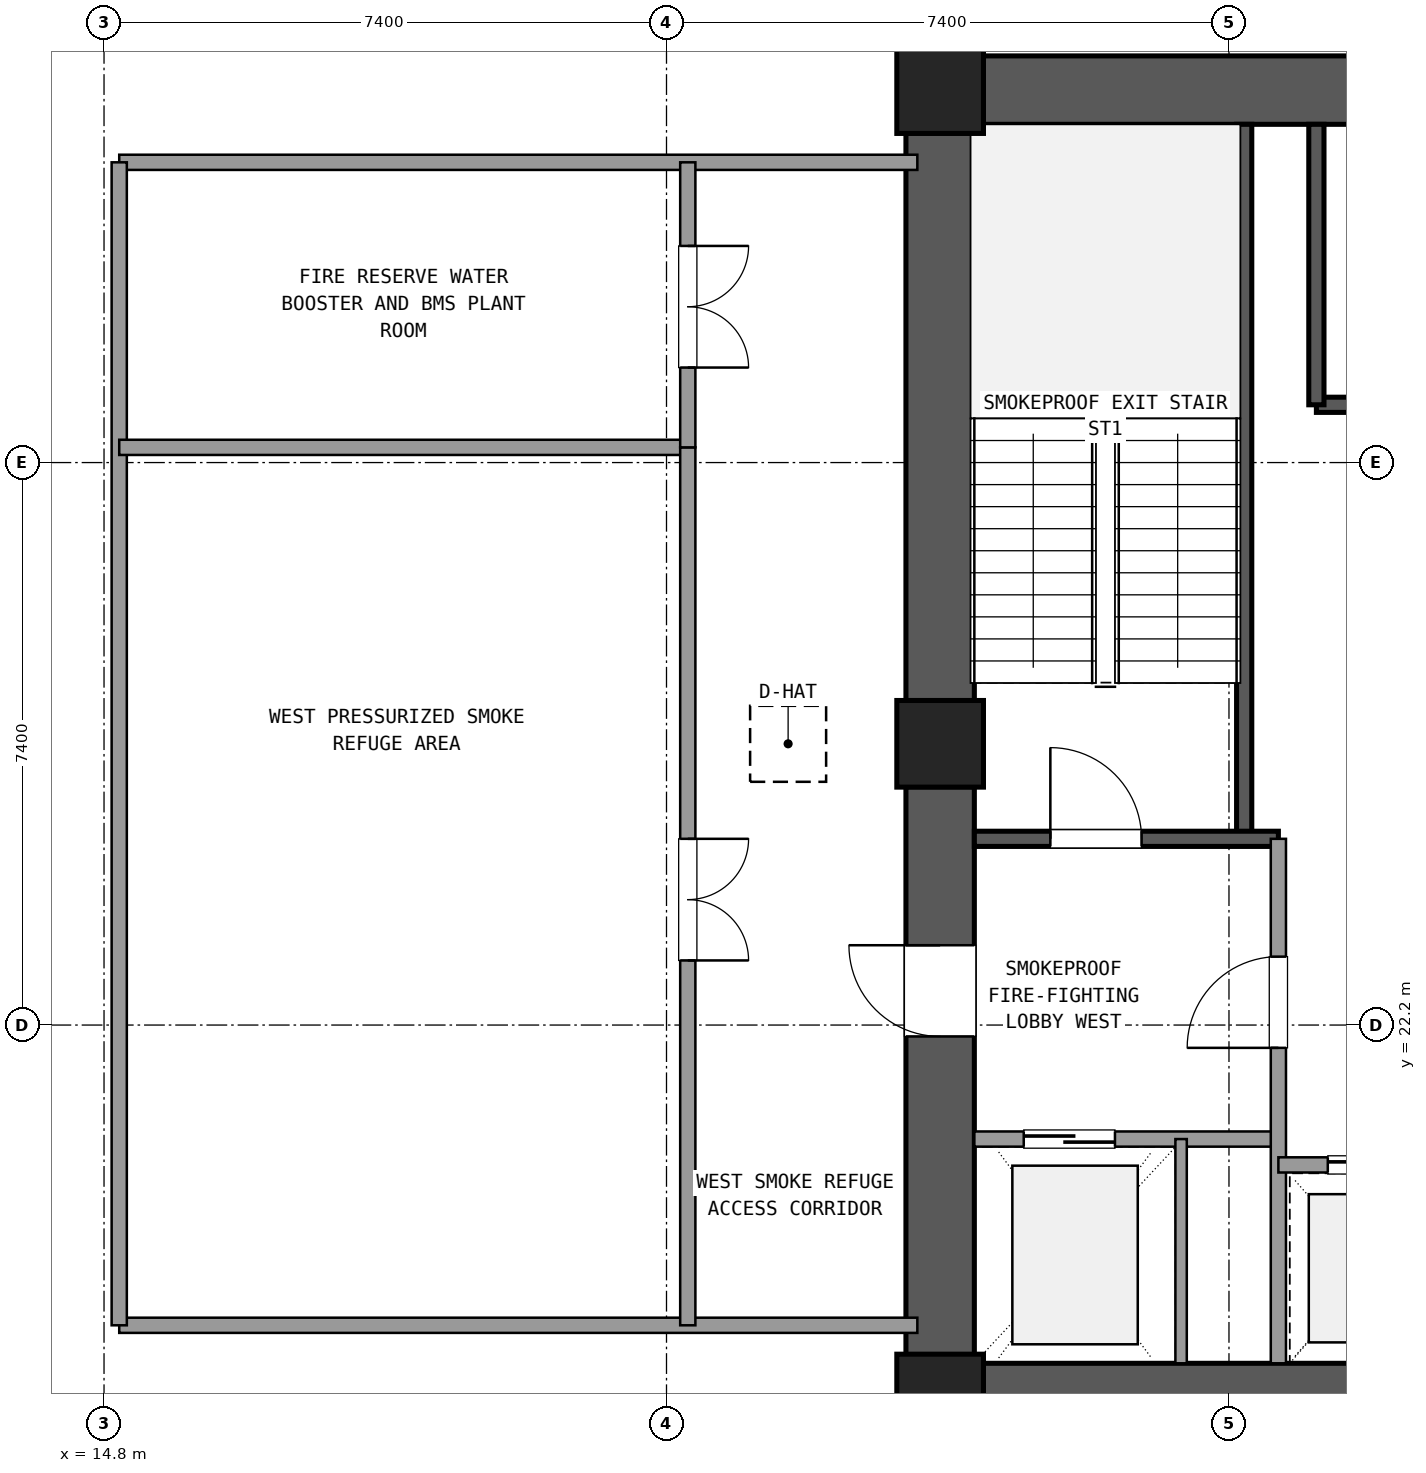
"""IFC4 building model, lengths in metres.
Left out: names, types, materials, properties, quantities, classifications, styles, units other than length and angle.
Written with IfcOpenShell. Run it as: python <this file> out.ifc"""

import sys

from ifc_helpers import new_model, si_unit, direction, frame, frame_2d, origin, origin_2d, place, context, subcontext, project, spatial, rectangle, extrude, element, fill, save


model = new_model("IFC4")
c1 = context("Model", 3, precision=1e-05, world=origin(), true_north=direction((0.0, 1.0)))
c2 = subcontext(c1, "Body", "Model", "MODEL_VIEW")
j1 = project(units=[si_unit("LENGTHUNIT", "METRE"), si_unit("PLANEANGLEUNIT", "RADIAN")], contexts=[c1])
p1 = place(None, origin())
s1 = spatial("IfcSite", under=j1, at=p1, CompositionType="ELEMENT")
p2 = place(p1, origin())
s2 = spatial("IfcBuilding", under=s1, at=p2, CompositionType="ELEMENT")
p3 = place(p2, frame((0.0, 0.0, 70.74)))
s3 = spatial("IfcBuildingStorey", under=s2, at=p3, CompositionType="ELEMENT", Elevation=70.74)
for number, where, z_axis, x_axis in (
    (1, (25.8, 17.3, 0.0), (0.0, 0.0, 1.0), (1.0, 0.0, 0.0)),
    (2, (25.8, 34.5, 0.0), (0.0, 0.0, 1.0), (1.0, 0.0, 0.0)),
    (3, (25.8, 25.9, 0.0), (0.0, 0.0, 1.0), (1.0, 0.0, 0.0)),
):
    element("IfcColumn", number, at=place(p3, frame(where, z_axis=z_axis, x_axis=x_axis)), inside=s3, PredefinedType="COLUMN", context=c2, shape_type="SweptSolid", body=[
        extrude(rectangle(XDim=1.14, YDim=1.14, at=origin_2d()), origin(), (0.0, 0.0, 1.0), 4.68),
    ])
p4 = place(p3, frame((26.365, 17.3, 0.0), z_axis=(0.0, 0.0, 1.0), x_axis=(1.0, 0.0, 0.0)))
e4 = element("IfcWall", 4, at=p4, inside=s3, PredefinedType="SHEAR", context=c2, shape_type="SweptSolid", body=[
    extrude(rectangle(XDim=10.07, YDim=0.9, at=frame_2d((5.035, 0.0))), origin(), (0.0, 0.0, 1.0), 4.38),
])
p5 = place(p3, frame((36.435, 34.5, 0.0), z_axis=(0.0, 0.0, 1.0), x_axis=(-1.0, 0.0, 0.0)))
e5 = element("IfcWall", 5, at=p5, inside=s3, PredefinedType="SHEAR", context=c2, shape_type="SweptSolid", body=[
    extrude(rectangle(XDim=10.07, YDim=0.9, at=frame_2d((5.035, 0.0))), origin(), (0.0, 0.0, 1.0), 4.38),
])
p6 = place(p5, frame((4.035, 0.0, 0.0)))
e6 = element("IfcOpeningElement", 6, at=p6, cuts=e5, PredefinedType="OPENING", context=c2, shape_type="SweptSolid", body=[
    extrude(rectangle(XDim=1.2, YDim=2.15, at=frame_2d((0.6, 1.075))), frame((0.0, 0.46, 0.0), z_axis=(0.0, -1.0, 0.0), x_axis=(1.0, 0.0, 0.0)), (0.0, 0.0, 1.0), 0.92),
])
p7 = place(p3, frame((25.8, 33.935, 0.0), z_axis=(0.0, 0.0, 1.0), x_axis=(0.0, -1.0, 0.0)))
e7 = element("IfcWall", 7, at=p7, inside=s3, PredefinedType="SHEAR", context=c2, shape_type="SweptSolid", body=[
    extrude(rectangle(XDim=7.47, YDim=0.9, at=frame_2d((3.735, 0.0))), origin(), (0.0, 0.0, 1.0), 4.38),
])
p8 = place(p3, frame((25.8, 25.335, 0.0), z_axis=(0.0, 0.0, 1.0), x_axis=(0.0, -1.0, 0.0)))
e8 = element("IfcWall", 8, at=p8, inside=s3, PredefinedType="SHEAR", context=c2, shape_type="SweptSolid", body=[
    extrude(rectangle(XDim=7.47, YDim=0.9, at=frame_2d((3.735, 0.0))), origin(), (0.0, 0.0, 1.0), 4.38),
])
p9 = place(p8, frame((2.085, 0.0, 0.0)))
e9 = element("IfcOpeningElement", 9, at=p9, cuts=e8, PredefinedType="OPENING", context=c2, shape_type="SweptSolid", body=[
    extrude(rectangle(XDim=1.2, YDim=2.15, at=frame_2d((0.6, 1.075))), frame((0.0, 0.46, 0.0), z_axis=(0.0, -1.0, 0.0), x_axis=(1.0, 0.0, 0.0)), (0.0, 0.0, 1.0), 0.92),
])
p10 = place(p3, frame((29.8, 24.65, 0.0), z_axis=(0.0, 0.0, 1.0), x_axis=(0.0, 1.0, 0.0)))
e10 = element("IfcWall", 10, at=p10, inside=s3, PredefinedType="SHEAR", context=c2, shape_type="SweptSolid", body=[
    extrude(rectangle(XDim=9.4, YDim=0.2, at=frame_2d((4.7, 0.0))), origin(), (0.0, 0.0, 1.0), 4.38),
])
p11 = place(p3, frame((26.25, 24.65, 0.0), z_axis=(0.0, 0.0, 1.0), x_axis=(1.0, 0.0, 0.0)))
e11 = element("IfcWall", 11, at=p11, inside=s3, PredefinedType="SHEAR", context=c2, shape_type="SweptSolid", body=[
    extrude(rectangle(XDim=4.0, YDim=0.2, at=frame_2d((2.0, 0.0))), origin(), (0.0, 0.0, 1.0), 4.38),
])
p12 = place(p11, frame((1.0, 0.0, 0.0)))
e12 = element("IfcOpeningElement", 12, at=p12, cuts=e11, PredefinedType="OPENING", context=c2, shape_type="SweptSolid", body=[
    extrude(rectangle(XDim=1.2, YDim=2.15, at=frame_2d((0.6, 1.075))), frame((0.0, 0.11, 0.0), z_axis=(0.0, -1.0, 0.0), x_axis=(1.0, 0.0, 0.0)), (0.0, 0.0, 1.0), 0.22),
])
p13 = place(p3, frame((30.75, 30.36, 0.0), z_axis=(0.0, 0.0, 1.0), x_axis=(1.0, 0.0, 0.0)))
e13 = element("IfcWall", 13, at=p13, inside=s3, PredefinedType="SHEAR", context=c2, shape_type="SweptSolid", body=[
    extrude(rectangle(XDim=9.5, YDim=0.2, at=frame_2d((4.75, 0.0))), origin(), (0.0, 0.0, 1.0), 4.38),
])
p14 = place(p3, frame((30.75, 30.36, 0.0), z_axis=(0.0, 0.0, 1.0), x_axis=(0.0, 1.0, 0.0)))
e14 = element("IfcWall", 14, at=p14, inside=s3, PredefinedType="SHEAR", context=c2, shape_type="SweptSolid", body=[
    extrude(rectangle(XDim=3.69, YDim=0.2, at=frame_2d((1.845, 0.0))), origin(), (0.0, 0.0, 1.0), 4.38),
])
p15 = place(p3, frame((26.25, 20.7, 0.0), z_axis=(0.0, 0.0, 1.0), x_axis=(1.0, 0.0, 0.0)))
e15 = element("IfcWall", 15, at=p15, inside=s3, PredefinedType="SOLIDWALL", context=c2, shape_type="SweptSolid", body=[
    extrude(rectangle(XDim=4.0, YDim=0.2, at=frame_2d((2.0, 0.0))), origin(), (0.0, 0.0, 1.0), 2.75),
])
p16 = place(p15, frame((0.65, 0.0, 0.0)))
e16 = element("IfcOpeningElement", 16, at=p16, cuts=e15, PredefinedType="OPENING", context=c2, shape_type="SweptSolid", body=[
    extrude(rectangle(XDim=1.2, YDim=2.15, at=frame_2d((0.6, 1.075))), frame((0.0, 0.11, 0.0), z_axis=(0.0, -1.0, 0.0), x_axis=(1.0, 0.0, 0.0)), (0.0, 0.0, 1.0), 0.22),
])
p17 = place(p3, frame((30.25, 17.75, 0.0), z_axis=(0.0, 0.0, 1.0), x_axis=(0.0, 1.0, 0.0)))
e17 = element("IfcWall", 17, at=p17, inside=s3, PredefinedType="SOLIDWALL", context=c2, shape_type="SweptSolid", body=[
    extrude(rectangle(XDim=6.9, YDim=0.2, at=frame_2d((3.45, 0.0))), origin(), (0.0, 0.0, 1.0), 2.75),
])
p18 = place(p17, frame((4.15, 0.0, 0.0)))
e18 = element("IfcOpeningElement", 18, at=p18, cuts=e17, PredefinedType="OPENING", context=c2, shape_type="SweptSolid", body=[
    extrude(rectangle(XDim=1.2, YDim=2.15, at=frame_2d((0.6, 1.075))), frame((0.0, 0.11, 0.0), z_axis=(0.0, -1.0, 0.0), x_axis=(1.0, 0.0, 0.0)), (0.0, 0.0, 1.0), 0.22),
])
p19 = place(p3, frame((28.97, 17.75, 0.0), z_axis=(0.0, 0.0, 1.0), x_axis=(0.0, 1.0, 0.0)))
e19 = element("IfcWall", 19, at=p19, inside=s3, PredefinedType="PARTITIONING", context=c2, shape_type="SweptSolid", body=[
    extrude(rectangle(XDim=2.95, YDim=0.15, at=frame_2d((1.475, 0.0))), origin(), (0.0, 0.0, 1.0), 2.75),
])
p20 = place(p3, frame((30.25, 20.36, 0.0), z_axis=(0.0, 0.0, 1.0), x_axis=(1.0, 0.0, 0.0)))
e20 = element("IfcWall", 20, at=p20, inside=s3, PredefinedType="SOLIDWALL", context=c2, shape_type="SweptSolid", body=[
    extrude(rectangle(XDim=7.0, YDim=0.2, at=frame_2d((3.5, 0.0))), origin(), (0.0, 0.0, 1.0), 2.75),
])
p21 = place(p20, frame((0.65, 0.0, 0.0)))
e21 = element("IfcOpeningElement", 21, at=p21, cuts=e20, PredefinedType="OPENING", context=c2, shape_type="SweptSolid", body=[
    extrude(rectangle(XDim=1.1, YDim=2.15, at=frame_2d((0.55, 1.075))), frame((0.0, 0.11, 0.0), z_axis=(0.0, -1.0, 0.0), x_axis=(1.0, 0.0, 0.0)), (0.0, 0.0, 1.0), 0.22),
])
p22 = place(p20, frame((2.95, 0.0, 0.0)))
e22 = element("IfcOpeningElement", 22, at=p22, cuts=e20, PredefinedType="OPENING", context=c2, shape_type="SweptSolid", body=[
    extrude(rectangle(XDim=1.1, YDim=2.15, at=frame_2d((0.55, 1.075))), frame((0.0, 0.11, 0.0), z_axis=(0.0, -1.0, 0.0), x_axis=(1.0, 0.0, 0.0)), (0.0, 0.0, 1.0), 0.22),
])
p23 = place(p20, frame((5.25, 0.0, 0.0)))
e23 = element("IfcOpeningElement", 23, at=p23, cuts=e20, PredefinedType="OPENING", context=c2, shape_type="SweptSolid", body=[
    extrude(rectangle(XDim=1.1, YDim=2.15, at=frame_2d((0.55, 1.075))), frame((0.0, 0.11, 0.0), z_axis=(0.0, -1.0, 0.0), x_axis=(1.0, 0.0, 0.0)), (0.0, 0.0, 1.0), 0.22),
])
p24 = place(p3, frame((26.0, 34.8, 0.0), z_axis=(0.0, 0.0, 1.0), x_axis=(0.0, 1.0, 0.0)))
e24 = element("IfcWall", 24, at=p24, inside=s3, PredefinedType="SOLIDWALL", context=c2, shape_type="SweptSolid", body=[
    extrude(rectangle(XDim=10.4, YDim=0.2, at=frame_2d((5.2, 0.0))), origin(), (0.0, 0.0, 1.0), 2.75),
])
for number, where, z_axis, x_axis in (
    (25, (15.0, 18.25, 0.0), (0.0, 0.0, 1.0), (1.0, 0.0, 0.0)),
    (26, (15.0, 33.55, 0.0), (0.0, 0.0, 1.0), (1.0, 0.0, 0.0)),
):
    element("IfcWall", number, at=place(p3, frame(where, z_axis=z_axis, x_axis=x_axis)), inside=s3, PredefinedType="SOLIDWALL", context=c2, shape_type="SweptSolid", body=[
        extrude(rectangle(XDim=10.5, YDim=0.2, at=frame_2d((5.25, 0.0))), origin(), (0.0, 0.0, 1.0), 2.75),
    ])
p25 = place(p3, frame((15.0, 18.25, 0.0), z_axis=(0.0, 0.0, 1.0), x_axis=(0.0, 1.0, 0.0)))
e27 = element("IfcWall", 27, at=p25, inside=s3, PredefinedType="SOLIDWALL", context=c2, shape_type="SweptSolid", body=[
    extrude(rectangle(XDim=15.3, YDim=0.2, at=frame_2d((7.65, 0.0))), origin(), (0.0, 0.0, 1.0), 2.75),
])
p26 = place(p3, frame((15.0, 29.8, 0.0), z_axis=(0.0, 0.0, 1.0), x_axis=(1.0, 0.0, 0.0)))
e28 = element("IfcWall", 28, at=p26, inside=s3, PredefinedType="SOLIDWALL", context=c2, shape_type="SweptSolid", body=[
    extrude(rectangle(XDim=7.48, YDim=0.2, at=frame_2d((3.74, 0.0))), origin(), (0.0, 0.0, 1.0), 2.75),
])
p27 = place(p3, frame((22.48, 18.25, 0.0), z_axis=(0.0, 0.0, 1.0), x_axis=(0.0, 1.0, 0.0)))
e29 = element("IfcWall", 29, at=p27, inside=s3, PredefinedType="SOLIDWALL", context=c2, shape_type="SweptSolid", body=[
    extrude(rectangle(XDim=11.55, YDim=0.2, at=frame_2d((5.775, 0.0))), origin(), (0.0, 0.0, 1.0), 2.75),
])
p28 = place(p27, frame((4.8, 0.0, 0.0)))
e30 = element("IfcOpeningElement", 30, at=p28, cuts=e29, PredefinedType="OPENING", context=c2, shape_type="SweptSolid", body=[
    extrude(rectangle(XDim=1.6, YDim=2.2, at=frame_2d((0.8, 1.1))), frame((0.0, 0.11, 0.0), z_axis=(0.0, -1.0, 0.0), x_axis=(1.0, 0.0, 0.0)), (0.0, 0.0, 1.0), 0.22),
])
p29 = place(p3, frame((22.48, 29.8, 0.0), z_axis=(0.0, 0.0, 1.0), x_axis=(0.0, 1.0, 0.0)))
e31 = element("IfcWall", 31, at=p29, inside=s3, PredefinedType="SOLIDWALL", context=c2, shape_type="SweptSolid", body=[
    extrude(rectangle(XDim=3.75, YDim=0.2, at=frame_2d((1.875, 0.0))), origin(), (0.0, 0.0, 1.0), 2.75),
])
p30 = place(p29, frame((1.05, 0.0, 0.0)))
e32 = element("IfcOpeningElement", 32, at=p30, cuts=e31, PredefinedType="OPENING", context=c2, shape_type="SweptSolid", body=[
    extrude(rectangle(XDim=1.6, YDim=2.2, at=frame_2d((0.8, 1.1))), frame((0.0, 0.11, 0.0), z_axis=(0.0, -1.0, 0.0), x_axis=(1.0, 0.0, 0.0)), (0.0, 0.0, 1.0), 0.22),
])
p31 = place(p3, frame((0.0, 0.0, -0.3)))
p32 = place(p31, frame((23.8, 25.9, -0.01)))
p33 = place(p32, frame((0.0, 0.0, 0.29)))
e33 = element("IfcDoor", 33, at=p33, inside=s3, OperationType="SINGLE_SWING_LEFT", PredefinedType="TRAPDOOR", context=c2, shape_type="SweptSolid", body=[
    extrude(rectangle(XDim=1.0, YDim=1.0, at=origin_2d()), origin(), (0.0, 0.0, 1.0), 0.02),
])
p34 = place(p12, origin())
e34 = element("IfcDoor", 34, at=p34, inside=s3, OperationType="SINGLE_SWING_LEFT", PredefinedType="DOOR", context=c2, shape_type="SweptSolid", body=[
    extrude(rectangle(XDim=1.2, YDim=2.15, at=frame_2d((0.6, 1.075))), frame((0.0, 0.025, 0.0), z_axis=(0.0, -1.0, 0.0), x_axis=(1.0, 0.0, 0.0)), (0.0, 0.0, 1.0), 0.05),
])
fill(e12, e34)
p35 = place(p16, origin())
e35 = element("IfcDoor", 35, at=p35, inside=s3, OperationType="SLIDING_TO_LEFT", PredefinedType="DOOR", context=c2, shape_type="SweptSolid", body=[
    extrude(rectangle(XDim=1.2, YDim=2.15, at=frame_2d((0.6, 1.075))), frame((0.0, 0.025, 0.0), z_axis=(0.0, -1.0, 0.0), x_axis=(1.0, 0.0, 0.0)), (0.0, 0.0, 1.0), 0.05),
])
fill(e16, e35)
p36 = place(p18, origin())
e36 = element("IfcDoor", 36, at=p36, inside=s3, OperationType="SINGLE_SWING_LEFT", PredefinedType="DOOR", context=c2, shape_type="SweptSolid", body=[
    extrude(rectangle(XDim=1.2, YDim=2.15, at=frame_2d((0.6, 1.075))), frame((0.0, 0.025, 0.0), z_axis=(0.0, -1.0, 0.0), x_axis=(1.0, 0.0, 0.0)), (0.0, 0.0, 1.0), 0.05),
])
fill(e18, e36)
p37 = place(p9, frame((1.2, 0.0, 0.0), z_axis=(0.0, 0.0, 1.0), x_axis=(-1.0, 0.0, 0.0)))
e37 = element("IfcDoor", 37, at=p37, inside=s3, OperationType="SINGLE_SWING_LEFT", PredefinedType="DOOR", context=c2, shape_type="SweptSolid", body=[
    extrude(rectangle(XDim=1.2, YDim=2.15, at=frame_2d((0.6, 1.075))), frame((0.0, 0.025, 0.0), z_axis=(0.0, -1.0, 0.0), x_axis=(1.0, 0.0, 0.0)), (0.0, 0.0, 1.0), 0.05),
])
fill(e9, e37)
p38 = place(p21, origin())
e38 = element("IfcDoor", 38, at=p38, inside=s3, OperationType="SLIDING_TO_LEFT", PredefinedType="DOOR", context=c2, shape_type="SweptSolid", body=[
    extrude(rectangle(XDim=1.1, YDim=2.15, at=frame_2d((0.55, 1.075))), frame((0.0, 0.025, 0.0), z_axis=(0.0, -1.0, 0.0), x_axis=(1.0, 0.0, 0.0)), (0.0, 0.0, 1.0), 0.05),
])
fill(e21, e38)
p39 = place(p28, frame((1.6, 0.0, 0.0), z_axis=(0.0, 0.0, 1.0), x_axis=(-1.0, 0.0, 0.0)))
e39 = element("IfcDoor", 39, at=p39, inside=s3, OperationType="DOUBLE_DOOR_SINGLE_SWING", PredefinedType="DOOR", context=c2, shape_type="SweptSolid", body=[
    extrude(rectangle(XDim=1.6, YDim=2.2, at=frame_2d((0.8, 1.1))), frame((0.0, 0.025, 0.0), z_axis=(0.0, -1.0, 0.0), x_axis=(1.0, 0.0, 0.0)), (0.0, 0.0, 1.0), 0.05),
])
fill(e30, e39)
p40 = place(p30, frame((1.6, 0.0, 0.0), z_axis=(0.0, 0.0, 1.0), x_axis=(-1.0, 0.0, 0.0)))
e40 = element("IfcDoor", 40, at=p40, inside=s3, OperationType="DOUBLE_DOOR_SINGLE_SWING", PredefinedType="DOOR", context=c2, shape_type="SweptSolid", body=[
    extrude(rectangle(XDim=1.6, YDim=2.2, at=frame_2d((0.8, 1.1))), frame((0.0, 0.025, 0.0), z_axis=(0.0, -1.0, 0.0), x_axis=(1.0, 0.0, 0.0)), (0.0, 0.0, 1.0), 0.05),
])
fill(e32, e40)
save(model, sys.argv[1])
